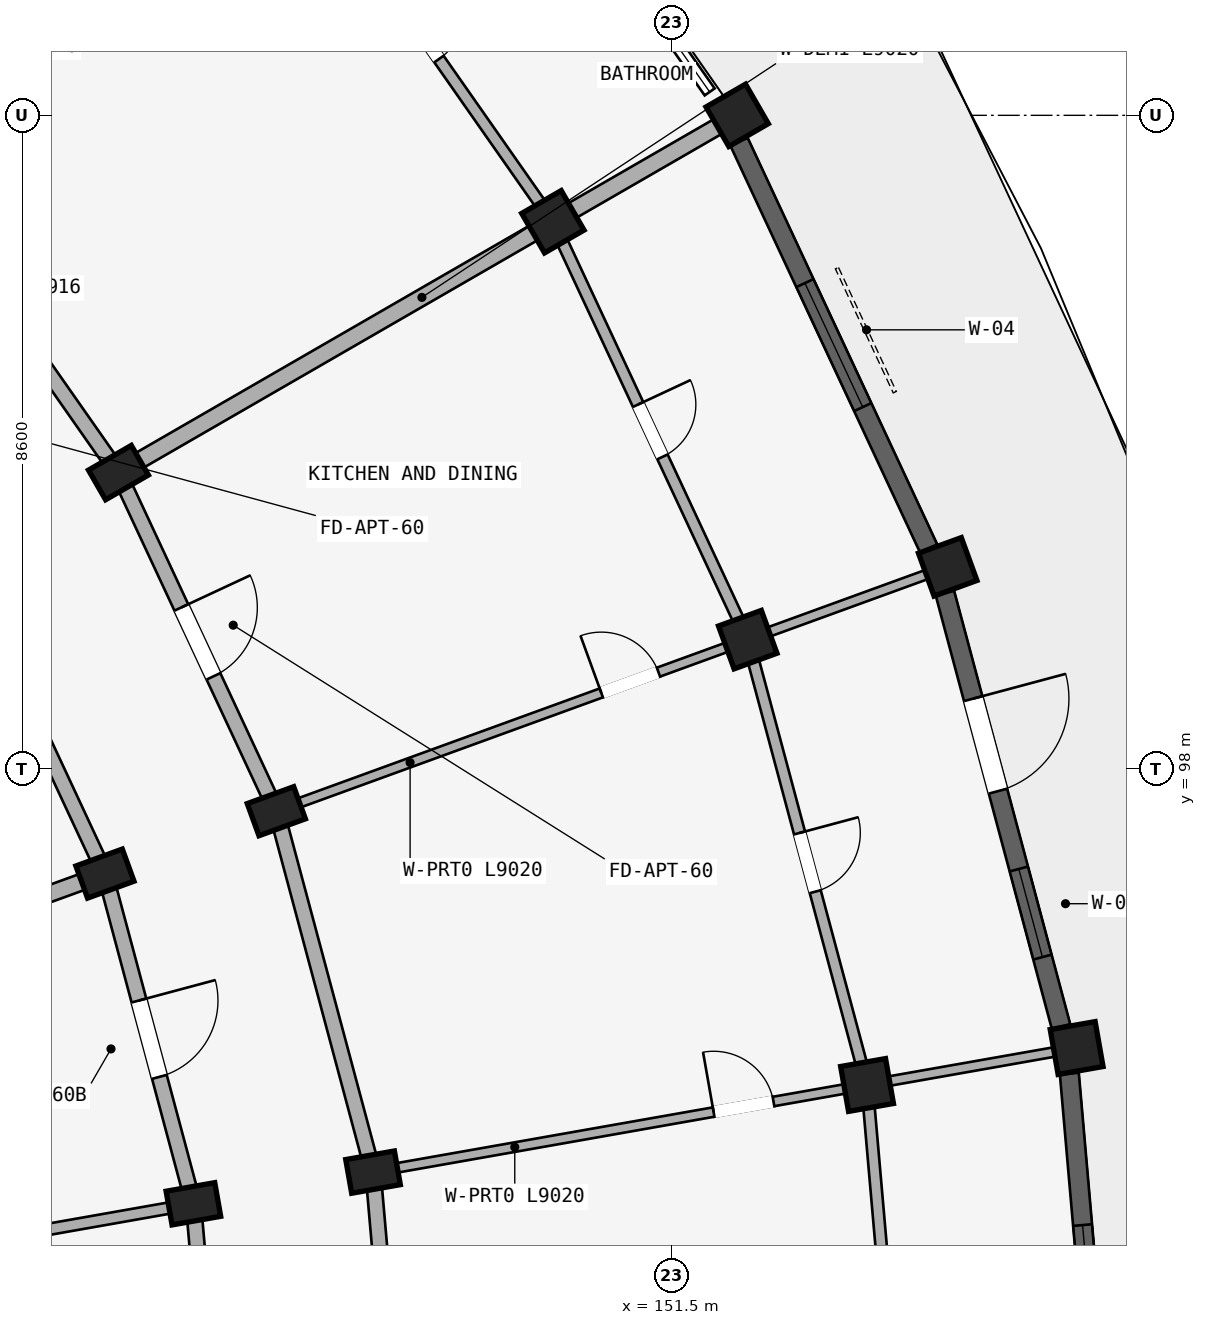
"""IFC4 building model, lengths in metres.
Left out: names, types, materials, properties, quantities, classifications, styles, units other than length and angle.
Written with IfcOpenShell. Run it as: python <this file> out.ifc"""

import sys

from ifc_helpers import new_model, si_unit, direction, frame, frame_2d, origin, origin_2d, place, context, subcontext, project, spatial, rectangle, extrude, element, fill, save


model = new_model("IFC4")
c1 = context("Model", 3, precision=1e-05, world=origin(), true_north=direction((0.0, 1.0)))
c2 = subcontext(c1, "Body", "Model", "MODEL_VIEW")
j1 = project(units=[si_unit("LENGTHUNIT", "METRE"), si_unit("PLANEANGLEUNIT", "RADIAN")], contexts=[c1])
p1 = place(None, origin())
s1 = spatial("IfcSite", under=j1, at=p1, CompositionType="ELEMENT")
p2 = place(p1, origin())
s2 = spatial("IfcBuilding", under=s1, at=p2, CompositionType="ELEMENT")
p3 = place(p2, frame((0.0, 0.0, 37.05)))
s3 = spatial("IfcBuildingStorey", under=s2, at=p3, CompositionType="ELEMENT", Elevation=37.05)
p4 = place(p3, frame((144.222, 101.9, 0.0), z_axis=(0.0, 0.0, 1.0), x_axis=(-0.5, 0.866025403784, 0.0)))
e1 = element("IfcColumn", 1, at=p4, inside=s3, PredefinedType="COLUMN", context=c2, shape_type="SweptSolid", body=[
    extrude(rectangle(XDim=0.45, YDim=0.65, at=origin_2d()), origin(), (0.0, 0.0, 1.0), 2.93),
])
p5 = place(p3, frame((149.938, 105.2, 0.0), z_axis=(0.0, 0.0, 1.0), x_axis=(-0.5, 0.866025403784, 0.0)))
e2 = element("IfcColumn", 2, at=p5, inside=s3, PredefinedType="COLUMN", context=c2, shape_type="SweptSolid", body=[
    extrude(rectangle(XDim=0.6, YDim=0.6, at=origin_2d()), origin(), (0.0, 0.0, 1.0), 2.93),
])
p6 = place(p3, frame((152.363, 106.6, 0.0), z_axis=(0.0, 0.0, 1.0), x_axis=(-0.5, 0.866025403784, 0.0)))
e3 = element("IfcColumn", 3, at=p6, inside=s3, PredefinedType="COLUMN", context=c2, shape_type="SweptSolid", body=[
    extrude(rectangle(XDim=0.6, YDim=0.6, at=origin_2d()), origin(), (0.0, 0.0, 1.0), 2.97),
])
for number, where, z_axis, x_axis in (
    (4, (144.044, 96.624, 0.0), (0.0, 0.0, 1.0), (-0.342, 0.94, 0.0)),
    (5, (146.299, 97.445, 0.0), (0.0, 0.0, 1.0), (-0.342, 0.94, 0.0)),
):
    element("IfcColumn", number, at=place(p3, frame(where, z_axis=z_axis, x_axis=x_axis)), inside=s3, PredefinedType="COLUMN", context=c2, shape_type="SweptSolid", body=[
        extrude(rectangle(XDim=0.45, YDim=0.65, at=origin_2d()), origin(), (0.0, 0.0, 1.0), 2.93),
    ])
p7 = place(p3, frame((152.501, 99.702, 0.0), z_axis=(0.0, 0.0, 1.0), x_axis=(-0.342020143326, 0.939692620786, 0.0)))
e6 = element("IfcColumn", 6, at=p7, inside=s3, PredefinedType="COLUMN", context=c2, shape_type="SweptSolid", body=[
    extrude(rectangle(XDim=0.6, YDim=0.6, at=origin_2d()), origin(), (0.0, 0.0, 1.0), 2.93),
])
p8 = place(p3, frame((155.132, 100.66, 0.0), z_axis=(0.0, 0.0, 1.0), x_axis=(-0.342020143326, 0.939692620786, 0.0)))
e7 = element("IfcColumn", 7, at=p8, inside=s3, PredefinedType="COLUMN", context=c2, shape_type="SweptSolid", body=[
    extrude(rectangle(XDim=0.6, YDim=0.6, at=origin_2d()), origin(), (0.0, 0.0, 1.0), 2.97),
])
for number, where, z_axis, x_axis in (
    (8, (145.208, 92.28, 0.0), (0.0, 0.0, 1.0), (-0.174, 0.985, 0.0)),
    (9, (147.572, 92.697, 0.0), (0.0, 0.0, 1.0), (-0.174, 0.985, 0.0)),
):
    element("IfcColumn", number, at=place(p3, frame(where, z_axis=z_axis, x_axis=x_axis)), inside=s3, PredefinedType="COLUMN", context=c2, shape_type="SweptSolid", body=[
        extrude(rectangle(XDim=0.45, YDim=0.65, at=origin_2d()), origin(), (0.0, 0.0, 1.0), 2.93),
    ])
p9 = place(p3, frame((154.071, 93.843, 0.0), z_axis=(0.0, 0.0, 1.0), x_axis=(-0.173648177667, 0.984807753012, 0.0)))
e10 = element("IfcColumn", 10, at=p9, inside=s3, PredefinedType="COLUMN", context=c2, shape_type="SweptSolid", body=[
    extrude(rectangle(XDim=0.6, YDim=0.6, at=origin_2d()), origin(), (0.0, 0.0, 1.0), 2.93),
])
p10 = place(p3, frame((156.829, 94.329, 0.0), z_axis=(0.0, 0.0, 1.0), x_axis=(-0.173648177667, 0.984807753012, 0.0)))
e11 = element("IfcColumn", 11, at=p10, inside=s3, PredefinedType="COLUMN", context=c2, shape_type="SweptSolid", body=[
    extrude(rectangle(XDim=0.6, YDim=0.6, at=origin_2d()), origin(), (0.0, 0.0, 1.0), 2.97),
])
p11 = place(p3, frame((141.402, 105.927, 0.0), z_axis=(0.0, 0.0, 1.0), x_axis=(0.573592335331, -0.819140911474, 0.0)))
e12 = element("IfcWall", 12, at=p11, inside=s3, PredefinedType="STANDARD", context=c2, shape_type="SweptSolid", body=[
    extrude(rectangle(XDim=4.916, YDim=0.2, at=frame_2d((2.458, 0.0))), origin(), (0.0, 0.0, 1.0), 2.372),
])
p12 = place(p3, frame((142.144, 100.7, 0.0), z_axis=(0.0, 0.0, 1.0), x_axis=(0.422617978463, -0.906307919131, 0.0)))
e13 = element("IfcWall", 13, at=p12, inside=s3, PredefinedType="STANDARD", context=c2, shape_type="SweptSolid", body=[
    extrude(rectangle(XDim=4.497, YDim=0.2, at=frame_2d((2.249, 0.0))), origin(), (0.0, 0.0, 1.0), 2.372),
])
p13 = place(p3, frame((144.222, 101.9, 0.0), z_axis=(0.0, 0.0, 1.0), x_axis=(0.422629854778, -0.906302381024, 0.0)))
e14 = element("IfcWall", 14, at=p13, inside=s3, PredefinedType="STANDARD", context=c2, shape_type="SweptSolid", body=[
    extrude(rectangle(XDim=4.915, YDim=0.2, at=frame_2d((2.458, 0.0))), origin(), (0.0, 0.0, 1.0), 2.372),
])
p14 = place(p13, frame((1.958, 0.0, 0.0)))
e15 = element("IfcOpeningElement", 15, at=p14, cuts=e14, PredefinedType="OPENING", context=c2, shape_type="SweptSolid", body=[
    extrude(rectangle(XDim=1.0, YDim=2.15, at=frame_2d((0.5, 1.075))), frame((0.0, 0.11, 0.0), z_axis=(0.0, -1.0, 0.0), x_axis=(1.0, 0.0, 0.0)), (0.0, 0.0, 1.0), 0.22),
])
p15 = place(p3, frame((144.044, 96.624, 0.0), z_axis=(0.0, 0.0, 1.0), x_axis=(0.258787642463, -0.965934240054, 0.0)))
e16 = element("IfcWall", 16, at=p15, inside=s3, PredefinedType="STANDARD", context=c2, shape_type="SweptSolid", body=[
    extrude(rectangle(XDim=4.497, YDim=0.2, at=frame_2d((2.249, 0.0))), origin(), (0.0, 0.0, 1.0), 2.372),
])
p16 = place(p15, frame((1.729, 0.0, 0.0)))
e17 = element("IfcOpeningElement", 17, at=p16, cuts=e16, PredefinedType="OPENING", context=c2, shape_type="SweptSolid", body=[
    extrude(rectangle(XDim=1.04, YDim=2.15, at=frame_2d((0.52, 1.075))), frame((0.0, 0.11, 0.0), z_axis=(0.0, -1.0, 0.0), x_axis=(1.0, 0.0, 0.0)), (0.0, 0.0, 1.0), 0.22),
])
p17 = place(p3, frame((146.299, 97.445, 0.0), z_axis=(0.0, 0.0, 1.0), x_axis=(0.258803112091, -0.965930095386, 0.0)))
e18 = element("IfcWall", 18, at=p17, inside=s3, PredefinedType="STANDARD", context=c2, shape_type="SweptSolid", body=[
    extrude(rectangle(XDim=4.916, YDim=0.2, at=frame_2d((2.458, 0.0))), origin(), (0.0, 0.0, 1.0), 2.372),
])
p18 = place(p3, frame((145.208, 92.28, 0.0), z_axis=(0.0, 0.0, 1.0), x_axis=(0.087187153726, -0.996191949488, 0.0)))
e19 = element("IfcWall", 19, at=p18, inside=s3, PredefinedType="STANDARD", context=c2, shape_type="SweptSolid", body=[
    extrude(rectangle(XDim=4.497, YDim=0.2, at=frame_2d((2.249, 0.0))), origin(), (0.0, 0.0, 1.0), 2.372),
])
p19 = place(p3, frame((147.572, 92.697, 0.0), z_axis=(0.0, 0.0, 1.0), x_axis=(0.087167566415, -0.996193663584, 0.0)))
e20 = element("IfcWall", 20, at=p19, inside=s3, PredefinedType="STANDARD", context=c2, shape_type="SweptSolid", body=[
    extrude(rectangle(XDim=4.916, YDim=0.2, at=frame_2d((2.458, 0.0))), origin(), (0.0, 0.0, 1.0), 2.372),
])
p20 = place(p3, frame((141.479, 105.991, 0.0), z_axis=(0.0, 0.0, 1.0), x_axis=(0.766047078847, 0.642784468535, 0.0)))
e21 = element("IfcWall", 21, at=p20, inside=s3, PredefinedType="PARTITIONING", context=c2, shape_type="SweptSolid", body=[
    extrude(rectangle(XDim=9.02, YDim=0.125, at=frame_2d((4.51, 0.0))), origin(), (0.0, 0.0, 1.0), 2.372),
])
p21 = place(p20, frame((4.45, 0.0, 0.0)))
e22 = element("IfcOpeningElement", 22, at=p21, cuts=e21, PredefinedType="OPENING", context=c2, shape_type="SweptSolid", body=[
    extrude(rectangle(XDim=0.8, YDim=2.1, at=frame_2d((0.4, 1.05))), frame((0.0, 0.073, 0.0), z_axis=(0.0, -1.0, 0.0), x_axis=(1.0, 0.0, 0.0)), (0.0, 0.0, 1.0), 0.145),
])
p22 = place(p3, frame((144.309, 101.95, 0.0), z_axis=(0.0, 0.0, 1.0), x_axis=(0.866024222538, 0.500002045973, 0.0)))
e23 = element("IfcWall", 23, at=p22, inside=s3, PredefinedType="STANDARD", context=c2, shape_type="SweptSolid", body=[
    extrude(rectangle(XDim=9.02, YDim=0.22, at=frame_2d((4.51, 0.0))), origin(), (0.0, 0.0, 1.0), 2.372),
])
p23 = place(p3, frame((137.654, 94.298, 0.0), z_axis=(0.0, 0.0, 1.0), x_axis=(0.939696231917, 0.342010221662, 0.0)))
e24 = element("IfcWall", 24, at=p23, inside=s3, PredefinedType="STANDARD", context=c2, shape_type="SweptSolid", body=[
    extrude(rectangle(XDim=6.75, YDim=0.22, at=frame_2d((3.375, 0.0))), origin(), (0.0, 0.0, 1.0), 2.372),
])
p24 = place(p3, frame((146.393, 97.479, 0.0), z_axis=(0.0, 0.0, 1.0), x_axis=(0.939695392201, 0.342012528828, 0.0)))
e25 = element("IfcWall", 25, at=p24, inside=s3, PredefinedType="PARTITIONING", context=c2, shape_type="SweptSolid", body=[
    extrude(rectangle(XDim=9.02, YDim=0.125, at=frame_2d((4.51, 0.0))), origin(), (0.0, 0.0, 1.0), 2.372),
])
p25 = place(p24, frame((4.45, 0.0, 0.0)))
e26 = element("IfcOpeningElement", 26, at=p25, cuts=e25, PredefinedType="OPENING", context=c2, shape_type="SweptSolid", body=[
    extrude(rectangle(XDim=0.8, YDim=2.1, at=frame_2d((0.4, 1.05))), frame((0.0, 0.073, 0.0), z_axis=(0.0, -1.0, 0.0), x_axis=(1.0, 0.0, 0.0)), (0.0, 0.0, 1.0), 0.145),
])
p26 = place(p3, frame((138.511, 91.099, 0.0), z_axis=(0.0, 0.0, 1.0), x_axis=(0.984807944945, 0.173647089161, 0.0)))
e27 = element("IfcWall", 27, at=p26, inside=s3, PredefinedType="PARTITIONING", context=c2, shape_type="SweptSolid", body=[
    extrude(rectangle(XDim=6.75, YDim=0.15, at=frame_2d((3.375, 0.0))), origin(), (0.0, 0.0, 1.0), 2.372),
])
p27 = place(p26, frame((3.222, 0.0, 0.0)))
e28 = element("IfcOpeningElement", 28, at=p27, cuts=e27, PredefinedType="OPENING", context=c2, shape_type="SweptSolid", body=[
    extrude(rectangle(XDim=0.98, YDim=2.12, at=frame_2d((0.49, 1.06))), frame((0.0, 0.085, 0.0), z_axis=(0.0, -1.0, 0.0), x_axis=(1.0, 0.0, 0.0)), (0.0, 0.0, 1.0), 0.17),
])
p28 = place(p3, frame((147.67, 92.714, 0.0), z_axis=(0.0, 0.0, 1.0), x_axis=(0.98480997874, 0.173635554464, 0.0)))
e29 = element("IfcWall", 29, at=p28, inside=s3, PredefinedType="PARTITIONING", context=c2, shape_type="SweptSolid", body=[
    extrude(rectangle(XDim=9.02, YDim=0.125, at=frame_2d((4.51, 0.0))), origin(), (0.0, 0.0, 1.0), 2.372),
])
p29 = place(p28, frame((4.45, 0.0, 0.0)))
e30 = element("IfcOpeningElement", 30, at=p29, cuts=e29, PredefinedType="OPENING", context=c2, shape_type="SweptSolid", body=[
    extrude(rectangle(XDim=0.8, YDim=2.1, at=frame_2d((0.4, 1.05))), frame((0.0, 0.073, 0.0), z_axis=(0.0, -1.0, 0.0), x_axis=(1.0, 0.0, 0.0)), (0.0, 0.0, 1.0), 0.145),
])
p30 = place(p3, frame((146.458, 110.169, 0.0), z_axis=(0.0, 0.0, 1.0), x_axis=(0.573594691504, -0.81913926159, 0.0)))
e31 = element("IfcWall", 31, at=p30, inside=s3, PredefinedType="PLUMBINGWALL", context=c2, shape_type="SweptSolid", body=[
    extrude(rectangle(XDim=6.066, YDim=0.15, at=frame_2d((3.033, 0.0))), origin(), (0.0, 0.0, 1.0), 2.372),
])
p31 = place(p30, frame((2.613, 0.0, 0.0)))
e32 = element("IfcOpeningElement", 32, at=p31, cuts=e31, PredefinedType="OPENING", context=c2, shape_type="SweptSolid", body=[
    extrude(rectangle(XDim=0.84, YDim=2.1, at=frame_2d((0.42, 1.05))), frame((0.0, 0.085, 0.0), z_axis=(0.0, -1.0, 0.0), x_axis=(1.0, 0.0, 0.0)), (0.0, 0.0, 1.0), 0.17),
])
p32 = place(p3, frame((149.938, 105.2, 0.0), z_axis=(0.0, 0.0, 1.0), x_axis=(0.42260781991, -0.906312656069, 0.0)))
e33 = element("IfcWall", 33, at=p32, inside=s3, PredefinedType="PLUMBINGWALL", context=c2, shape_type="SweptSolid", body=[
    extrude(rectangle(XDim=6.066, YDim=0.15, at=frame_2d((3.033, 0.0))), origin(), (0.0, 0.0, 1.0), 2.372),
])
p33 = place(p32, frame((2.653, 0.0, 0.0)))
e34 = element("IfcOpeningElement", 34, at=p33, cuts=e33, PredefinedType="OPENING", context=c2, shape_type="SweptSolid", body=[
    extrude(rectangle(XDim=0.76, YDim=2.05, at=frame_2d((0.38, 1.025))), frame((0.0, 0.085, 0.0), z_axis=(0.0, -1.0, 0.0), x_axis=(1.0, 0.0, 0.0)), (0.0, 0.0, 1.0), 0.17),
])
p34 = place(p3, frame((152.501, 99.702, 0.0), z_axis=(0.0, 0.0, 1.0), x_axis=(0.258827283048, -0.965923618901, 0.0)))
e35 = element("IfcWall", 35, at=p34, inside=s3, PredefinedType="PLUMBINGWALL", context=c2, shape_type="SweptSolid", body=[
    extrude(rectangle(XDim=6.066, YDim=0.15, at=frame_2d((3.033, 0.0))), origin(), (0.0, 0.0, 1.0), 2.372),
])
p35 = place(p34, frame((2.633, 0.0, 0.0)))
e36 = element("IfcOpeningElement", 36, at=p35, cuts=e35, PredefinedType="OPENING", context=c2, shape_type="SweptSolid", body=[
    extrude(rectangle(XDim=0.8, YDim=2.1, at=frame_2d((0.4, 1.05))), frame((0.0, 0.085, 0.0), z_axis=(0.0, -1.0, 0.0), x_axis=(1.0, 0.0, 0.0)), (0.0, 0.0, 1.0), 0.17),
])
p36 = place(p3, frame((154.071, 93.843, 0.0), z_axis=(0.0, 0.0, 1.0), x_axis=(0.087174938512, -0.996193018494, 0.0)))
e37 = element("IfcWall", 37, at=p36, inside=s3, PredefinedType="PLUMBINGWALL", context=c2, shape_type="SweptSolid", body=[
    extrude(rectangle(XDim=6.066, YDim=0.15, at=frame_2d((3.033, 0.0))), origin(), (0.0, 0.0, 1.0), 2.372),
])
p37 = place(p36, frame((2.613, 0.0, 0.0)))
e38 = element("IfcOpeningElement", 38, at=p37, cuts=e37, PredefinedType="OPENING", context=c2, shape_type="SweptSolid", body=[
    extrude(rectangle(XDim=0.84, YDim=2.1, at=frame_2d((0.42, 1.05))), frame((0.0, 0.085, 0.0), z_axis=(0.0, -1.0, 0.0), x_axis=(1.0, 0.0, 0.0)), (0.0, 0.0, 1.0), 0.17),
])
p38 = place(p3, frame((152.387, 106.252, 0.0), z_axis=(0.0, 0.0, 1.0), x_axis=(0.422627318927, -0.906303563546, 0.0)))
e39 = element("IfcWall", 39, at=p38, inside=s3, PredefinedType="STANDARD", context=c2, shape_type="SweptSolid", body=[
    extrude(rectangle(XDim=5.903, YDim=0.25, at=frame_2d((2.951, 0.0))), origin(), (0.0, 0.0, 1.0), 2.412),
])
p39 = place(p38, frame((2.052, 0.0, 0.562)))
e40 = element("IfcOpeningElement", 40, at=p39, cuts=e39, PredefinedType="OPENING", context=c2, shape_type="SweptSolid", body=[
    extrude(rectangle(XDim=1.8, YDim=1.65, at=frame_2d((0.9, 0.825))), frame((0.0, 0.135, 0.0), z_axis=(0.0, -1.0, 0.0), x_axis=(1.0, 0.0, 0.0)), (0.0, 0.0, 1.0), 0.27),
])
p40 = place(p3, frame((155.096, 100.313, 0.0), z_axis=(0.0, 0.0, 1.0), x_axis=(0.258831183778, -0.965922573659, 0.0)))
e41 = element("IfcWall", 41, at=p40, inside=s3, PredefinedType="STANDARD", context=c2, shape_type="SweptSolid", body=[
    extrude(rectangle(XDim=5.903, YDim=0.25, at=frame_2d((2.951, 0.0))), origin(), (0.0, 0.0, 1.0), 2.412),
])
p41 = place(p40, frame((3.756, 0.0, 0.312)))
e42 = element("IfcOpeningElement", 42, at=p41, cuts=e41, PredefinedType="OPENING", context=c2, shape_type="SweptSolid", body=[
    extrude(rectangle(XDim=1.2, YDim=1.5, at=frame_2d((0.6, 0.75))), frame((0.0, 0.135, 0.0), z_axis=(0.0, -1.0, 0.0), x_axis=(1.0, 0.0, 0.0)), (0.0, 0.0, 1.0), 0.27),
])
p42 = place(p40, frame((1.436, 0.0, 0.0)))
e43 = element("IfcOpeningElement", 43, at=p42, cuts=e41, PredefinedType="OPENING", context=c2, shape_type="SweptSolid", body=[
    extrude(rectangle(XDim=1.26, YDim=2.15, at=frame_2d((0.63, 1.075))), frame((0.0, 0.135, 0.0), z_axis=(0.0, -1.0, 0.0), x_axis=(1.0, 0.0, 0.0)), (0.0, 0.0, 1.0), 0.27),
])
p43 = place(p3, frame((156.733, 93.994, 0.0), z_axis=(0.0, 0.0, 1.0), x_axis=(0.087145401275, -0.996195602799, 0.0)))
e44 = element("IfcWall", 44, at=p43, inside=s3, PredefinedType="STANDARD", context=c2, shape_type="SweptSolid", body=[
    extrude(rectangle(XDim=5.903, YDim=0.25, at=frame_2d((2.951, 0.0))), origin(), (0.0, 0.0, 1.0), 2.412),
])
p44 = place(p43, frame((2.001, 0.0, 0.462)))
e45 = element("IfcOpeningElement", 45, at=p44, cuts=e44, PredefinedType="OPENING", context=c2, shape_type="SweptSolid", body=[
    extrude(rectangle(XDim=1.9, YDim=1.75, at=frame_2d((0.95, 0.875))), frame((0.0, 0.135, 0.0), z_axis=(0.0, -1.0, 0.0), x_axis=(1.0, 0.0, 0.0)), (0.0, 0.0, 1.0), 0.27),
])
p45 = place(p39, origin())
e46 = element("IfcWindow", 46, at=p45, inside=s3, PartitioningType="DOUBLE_PANEL_VERTICAL", PredefinedType="WINDOW", context=c2, shape_type="SweptSolid", body=[
    extrude(rectangle(XDim=1.8, YDim=1.65, at=frame_2d((0.9, 0.825))), frame((0.0, 0.03, 0.0), z_axis=(0.0, -1.0, 0.0), x_axis=(1.0, 0.0, 0.0)), (0.0, 0.0, 1.0), 0.06),
])
fill(e40, e46)
p46 = place(p41, origin())
e47 = element("IfcWindow", 47, at=p46, inside=s3, PartitioningType="SINGLE_PANEL", PredefinedType="WINDOW", context=c2, shape_type="SweptSolid", body=[
    extrude(rectangle(XDim=1.2, YDim=1.5, at=frame_2d((0.6, 0.75))), frame((0.0, 0.03, 0.0), z_axis=(0.0, -1.0, 0.0), x_axis=(1.0, 0.0, 0.0)), (0.0, 0.0, 1.0), 0.06),
])
fill(e42, e47)
p47 = place(p44, origin())
e48 = element("IfcWindow", 48, at=p47, inside=s3, PartitioningType="DOUBLE_PANEL_VERTICAL", PredefinedType="WINDOW", context=c2, shape_type="SweptSolid", body=[
    extrude(rectangle(XDim=1.9, YDim=1.75, at=frame_2d((0.95, 0.875))), frame((0.0, 0.03, 0.0), z_axis=(0.0, -1.0, 0.0), x_axis=(1.0, 0.0, 0.0)), (0.0, 0.0, 1.0), 0.06),
])
fill(e45, e48)
p48 = place(p25, frame((0.8, 0.0, 0.0), z_axis=(0.0, 0.0, 1.0), x_axis=(-1.0, 0.0, 0.0)))
e49 = element("IfcDoor", 49, at=p48, inside=s3, OperationType="SINGLE_SWING_RIGHT", PredefinedType="DOOR", context=c2, shape_type="SweptSolid", body=[
    extrude(rectangle(XDim=0.8, YDim=2.1, at=frame_2d((0.4, 1.05))), frame((0.0, 0.025, 0.0), z_axis=(0.0, -1.0, 0.0), x_axis=(1.0, 0.0, 0.0)), (0.0, 0.0, 1.0), 0.05),
])
fill(e26, e49)
p49 = place(p29, frame((0.8, 0.0, 0.0), z_axis=(0.0, 0.0, 1.0), x_axis=(-1.0, 0.0, 0.0)))
e50 = element("IfcDoor", 50, at=p49, inside=s3, OperationType="SINGLE_SWING_RIGHT", PredefinedType="DOOR", context=c2, shape_type="SweptSolid", body=[
    extrude(rectangle(XDim=0.8, YDim=2.1, at=frame_2d((0.4, 1.05))), frame((0.0, 0.025, 0.0), z_axis=(0.0, -1.0, 0.0), x_axis=(1.0, 0.0, 0.0)), (0.0, 0.0, 1.0), 0.05),
])
fill(e30, e50)
p50 = place(p31, origin())
e51 = element("IfcDoor", 51, at=p50, inside=s3, OperationType="SINGLE_SWING_LEFT", PredefinedType="DOOR", context=c2, shape_type="SweptSolid", body=[
    extrude(rectangle(XDim=0.84, YDim=2.1, at=frame_2d((0.42, 1.05))), frame((0.0, 0.025, 0.0), z_axis=(0.0, -1.0, 0.0), x_axis=(1.0, 0.0, 0.0)), (0.0, 0.0, 1.0), 0.05),
])
fill(e32, e51)
p51 = place(p14, frame((1.0, 0.0, 0.0), z_axis=(0.0, 0.0, 1.0), x_axis=(-1.0, 0.0, 0.0)))
e52 = element("IfcDoor", 52, at=p51, inside=s3, OperationType="SINGLE_SWING_RIGHT", PredefinedType="DOOR", context=c2, shape_type="SweptSolid", body=[
    extrude(rectangle(XDim=1.0, YDim=2.15, at=frame_2d((0.5, 1.075))), frame((0.0, 0.025, 0.0), z_axis=(0.0, -1.0, 0.0), x_axis=(1.0, 0.0, 0.0)), (0.0, 0.0, 1.0), 0.05),
])
fill(e15, e52)
p52 = place(p33, origin())
e53 = element("IfcDoor", 53, at=p52, inside=s3, OperationType="SINGLE_SWING_LEFT", PredefinedType="DOOR", context=c2, shape_type="SweptSolid", body=[
    extrude(rectangle(XDim=0.76, YDim=2.05, at=frame_2d((0.38, 1.025))), frame((0.0, 0.025, 0.0), z_axis=(0.0, -1.0, 0.0), x_axis=(1.0, 0.0, 0.0)), (0.0, 0.0, 1.0), 0.05),
])
fill(e34, e53)
p53 = place(p35, frame((0.8, 0.0, 0.0), z_axis=(0.0, 0.0, 1.0), x_axis=(-1.0, 0.0, 0.0)))
e54 = element("IfcDoor", 54, at=p53, inside=s3, OperationType="SINGLE_SWING_RIGHT", PredefinedType="DOOR", context=c2, shape_type="SweptSolid", body=[
    extrude(rectangle(XDim=0.8, YDim=2.1, at=frame_2d((0.4, 1.05))), frame((0.0, 0.025, 0.0), z_axis=(0.0, -1.0, 0.0), x_axis=(1.0, 0.0, 0.0)), (0.0, 0.0, 1.0), 0.05),
])
fill(e36, e54)
p54 = place(p16, origin())
e55 = element("IfcDoor", 55, at=p54, inside=s3, OperationType="SINGLE_SWING_LEFT", PredefinedType="DOOR", context=c2, shape_type="SweptSolid", body=[
    extrude(rectangle(XDim=1.04, YDim=2.15, at=frame_2d((0.52, 1.075))), frame((0.0, 0.025, 0.0), z_axis=(0.0, -1.0, 0.0), x_axis=(1.0, 0.0, 0.0)), (0.0, 0.0, 1.0), 0.05),
])
fill(e17, e55)
p55 = place(p42, origin())
e56 = element("IfcDoor", 56, at=p55, inside=s3, OperationType="SINGLE_SWING_LEFT", PredefinedType="DOOR", context=c2, shape_type="SweptSolid", body=[
    extrude(rectangle(XDim=1.26, YDim=2.15, at=frame_2d((0.63, 1.075))), frame((0.0, 0.025, 0.0), z_axis=(0.0, -1.0, 0.0), x_axis=(1.0, 0.0, 0.0)), (0.0, 0.0, 1.0), 0.05),
])
fill(e43, e56)
save(model, sys.argv[1])
